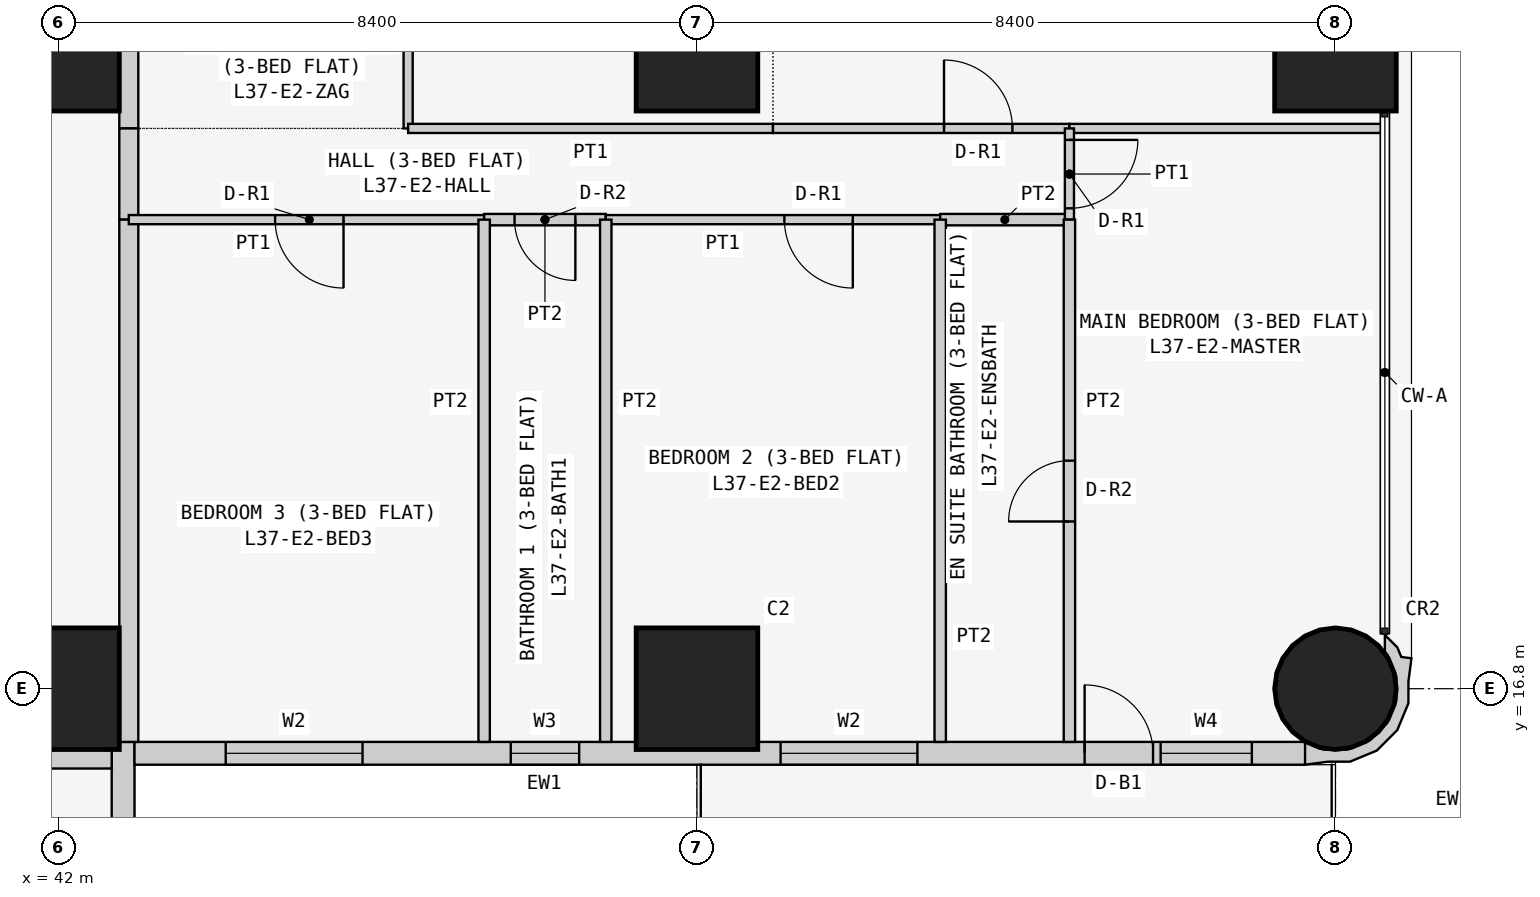
"""IFC4 building model, lengths in metres.
Left out: names, types, materials, properties, quantities, classifications, styles, units other than length and angle.
Written with IfcOpenShell. Run it as: python <this file> out.ifc"""

import sys

from ifc_helpers import new_model, si_unit, direction, frame, frame_2d, origin, origin_2d, place, context, subcontext, project, spatial, polyline, rectangle, circle, outline, extrude, element, fill, save


model = new_model("IFC4")
c1 = context("Model", 3, precision=1e-05, world=origin(), true_north=direction((0.0, 1.0)))
c2 = subcontext(c1, "Body", "Model", "MODEL_VIEW")
j1 = project(units=[si_unit("LENGTHUNIT", "METRE"), si_unit("PLANEANGLEUNIT", "RADIAN")], contexts=[c1])
p1 = place(None, origin())
s1 = spatial("IfcSite", under=j1, at=p1, CompositionType="ELEMENT")
p2 = place(p1, origin())
s2 = spatial("IfcBuilding", under=s1, at=p2, CompositionType="ELEMENT")
p3 = place(p2, frame((0.0, 0.0, 144.9)))
s3 = spatial("IfcBuildingStorey", under=s2, at=p3, CompositionType="ELEMENT", Elevation=144.9)
for number, where, z_axis, x_axis in (
    (1, (42.0, 16.8, 0.0), (0.0, 0.0, 1.0), (1.0, 0.0, 0.0)),
    (2, (42.0, 25.2, 0.0), (0.0, 0.0, 1.0), (1.0, 0.0, 0.0)),
    (3, (50.4, 16.8, 0.0), (0.0, 0.0, 1.0), (1.0, 0.0, 0.0)),
    (4, (50.4, 25.2, 0.0), (0.0, 0.0, 1.0), (1.0, 0.0, 0.0)),
):
    element("IfcColumn", number, at=place(p3, frame(where, z_axis=z_axis, x_axis=x_axis)), inside=s3, PredefinedType="COLUMN", context=c2, shape_type="SweptSolid", body=[
        extrude(rectangle(XDim=1.6, YDim=1.6, at=origin_2d()), origin(), (0.0, 0.0, 1.0), 3.6),
    ])
p4 = place(p3, frame((58.8, 16.8, 0.0), z_axis=(0.0, 0.0, 1.0), x_axis=(1.0, 0.0, 0.0)))
e5 = element("IfcColumn", 5, at=p4, inside=s3, PredefinedType="COLUMN", context=c2, shape_type="SweptSolid", body=[
    extrude(circle(Radius=0.8, at=origin_2d()), origin(), (0.0, 0.0, 1.0), 3.6),
])
p5 = place(p3, frame((58.8, 25.2, 0.0), z_axis=(0.0, 0.0, 1.0), x_axis=(1.0, 0.0, 0.0)))
e6 = element("IfcColumn", 6, at=p5, inside=s3, PredefinedType="COLUMN", context=c2, shape_type="SweptSolid", body=[
    extrude(rectangle(XDim=1.6, YDim=1.6, at=origin_2d()), origin(), (0.0, 0.0, 1.0), 3.6),
])
p6 = place(p3, frame((42.85, 8.8, 0.0), z_axis=(0.0, 0.0, 1.0), x_axis=(0.0, 1.0, 0.0)))
e7 = element("IfcWall", 7, at=p6, inside=s3, PredefinedType="SOLIDWALL", context=c2, shape_type="SweptSolid", body=[
    extrude(rectangle(XDim=7.3, YDim=0.3, at=frame_2d((3.65, 0.0))), origin(), (0.0, 0.0, 1.0), 3.45),
])
p7 = place(p6, frame((3.1, 0.0, 0.9)))
e8 = element("IfcOpeningElement", 8, at=p7, cuts=e7, PredefinedType="OPENING", context=c2, shape_type="SweptSolid", body=[
    extrude(rectangle(XDim=2.4, YDim=1.5, at=frame_2d((1.2, 0.75))), frame((0.0, 0.16, 0.0), z_axis=(0.0, -1.0, 0.0), x_axis=(1.0, 0.0, 0.0)), (0.0, 0.0, 1.0), 0.32),
])
p8 = place(p6, frame((0.75, 0.0, 0.9)))
e9 = element("IfcOpeningElement", 9, at=p8, cuts=e7, PredefinedType="OPENING", context=c2, shape_type="SweptSolid", body=[
    extrude(rectangle(XDim=1.2, YDim=1.5, at=frame_2d((0.6, 0.75))), frame((0.0, 0.16, 0.0), z_axis=(0.0, -1.0, 0.0), x_axis=(1.0, 0.0, 0.0)), (0.0, 0.0, 1.0), 0.32),
])
p9 = place(p3, frame((43.0, 15.95, 0.0), z_axis=(0.0, 0.0, 1.0), x_axis=(1.0, 0.0, 0.0)))
e10 = element("IfcWall", 10, at=p9, inside=s3, PredefinedType="SOLIDWALL", context=c2, shape_type="SweptSolid", body=[
    extrude(rectangle(XDim=15.4, YDim=0.3, at=frame_2d((7.7, 0.0))), origin(), (0.0, 0.0, 1.0), 3.45),
])
p10 = place(p9, frame((1.2, 0.0, 0.9)))
e11 = element("IfcOpeningElement", 11, at=p10, cuts=e10, PredefinedType="OPENING", context=c2, shape_type="SweptSolid", body=[
    extrude(rectangle(XDim=1.8, YDim=1.5, at=frame_2d((0.9, 0.75))), frame((0.0, 0.16, 0.0), z_axis=(0.0, -1.0, 0.0), x_axis=(1.0, 0.0, 0.0)), (0.0, 0.0, 1.0), 0.32),
])
p11 = place(p9, frame((4.95, 0.0, 1.5)))
e12 = element("IfcOpeningElement", 12, at=p11, cuts=e10, PredefinedType="OPENING", context=c2, shape_type="SweptSolid", body=[
    extrude(rectangle(XDim=0.9, YDim=0.7, at=frame_2d((0.45, 0.35))), frame((0.0, 0.16, 0.0), z_axis=(0.0, -1.0, 0.0), x_axis=(1.0, 0.0, 0.0)), (0.0, 0.0, 1.0), 0.32),
])
p12 = place(p9, frame((8.5, 0.0, 0.9)))
e13 = element("IfcOpeningElement", 13, at=p12, cuts=e10, PredefinedType="OPENING", context=c2, shape_type="SweptSolid", body=[
    extrude(rectangle(XDim=1.8, YDim=1.5, at=frame_2d((0.9, 0.75))), frame((0.0, 0.16, 0.0), z_axis=(0.0, -1.0, 0.0), x_axis=(1.0, 0.0, 0.0)), (0.0, 0.0, 1.0), 0.32),
])
p13 = place(p9, frame((12.5, 0.0, 0.0)))
e14 = element("IfcOpeningElement", 14, at=p13, cuts=e10, PredefinedType="OPENING", context=c2, shape_type="SweptSolid", body=[
    extrude(rectangle(XDim=0.9, YDim=2.4, at=frame_2d((0.45, 1.2))), frame((0.0, 0.16, 0.0), z_axis=(0.0, -1.0, 0.0), x_axis=(1.0, 0.0, 0.0)), (0.0, 0.0, 1.0), 0.32),
])
p14 = place(p9, frame((13.5, 0.0, 0.9)))
e15 = element("IfcOpeningElement", 15, at=p14, cuts=e10, PredefinedType="OPENING", context=c2, shape_type="SweptSolid", body=[
    extrude(rectangle(XDim=1.2, YDim=1.5, at=frame_2d((0.6, 0.75))), frame((0.0, 0.16, 0.0), z_axis=(0.0, -1.0, 0.0), x_axis=(1.0, 0.0, 0.0)), (0.0, 0.0, 1.0), 0.32),
])
p15 = place(p3, frame((58.473, 15.983, 0.0), z_axis=(0.0, 0.0, 1.0), x_axis=(0.93923434088, -0.343276641956, 0.0)))
e16 = element("IfcWall", 16, at=p15, inside=s3, PredefinedType="SOLIDWALL", context=c2, shape_type="SweptSolid", body=[
    extrude(outline(polyline([(0.828, 1.599), (0.697, 1.569), (0.604, 1.67), (0.394, 1.767), (0.471, 1.556), (0.508, 1.539), (0.724, 1.304), (0.834, 1.005), (0.82, 0.686), (0.686, 0.397), (0.451, 0.182), (0.152, 0.073), (-0.116, 0.084), (-0.127, 0.078), (-0.146, 0.071), (-0.006, -0.197), (0.266, -0.055), (0.535, 0.044), (0.817, 0.302), (0.978, 0.648), (0.994, 1.03), (0.895, 1.3), (0.828, 1.599)])), origin(), (0.0, 0.0, 1.0), 3.45),
])
p16 = place(p3, frame((42.925, 29.4, 0.0), z_axis=(0.0, 0.0, 1.0), x_axis=(0.0, -1.0, 0.0)))
e17 = element("IfcWall", 17, at=p16, inside=s3, PredefinedType="PARTITIONING", context=c2, shape_type="SweptSolid", body=[
    extrude(rectangle(XDim=5.229, YDim=0.25, at=frame_2d((2.615, 0.0))), origin(), (0.0, 0.0, 1.0), 3.45),
])
p17 = place(p16, frame((2.1, 0.0, 0.0)))
e18 = element("IfcOpeningElement", 18, at=p17, cuts=e17, PredefinedType="OPENING", context=c2, shape_type="SweptSolid", body=[
    extrude(rectangle(XDim=1.0, YDim=2.1, at=frame_2d((0.5, 1.05))), frame((0.0, 0.135, 0.0), z_axis=(0.0, -1.0, 0.0), x_axis=(1.0, 0.0, 0.0)), (0.0, 0.0, 1.0), 0.27),
])
p18 = place(p3, frame((42.925, 24.171, 0.0), z_axis=(0.0, 0.0, 1.0), x_axis=(0.0, -1.0, 0.0)))
e19 = element("IfcWall", 19, at=p18, inside=s3, PredefinedType="PARTITIONING", context=c2, shape_type="SweptSolid", body=[
    extrude(rectangle(XDim=1.2, YDim=0.25, at=frame_2d((0.6, 0.0))), origin(), (0.0, 0.0, 1.0), 3.45),
])
for number, where, z_axis, x_axis in (
    (20, (42.925, 22.971, 0.0), (0.0, 0.0, 1.0), (0.0, -1.0, 0.0)),
    (21, (42.7, 15.875, 0.0), (0.0, 0.0, 1.0), (-1.0, 0.0, 0.0)),
):
    element("IfcWall", number, at=place(p3, frame(where, z_axis=z_axis, x_axis=x_axis)), inside=s3, PredefinedType="PARTITIONING", context=c2, shape_type="SweptSolid", body=[
        extrude(rectangle(XDim=6.871, YDim=0.25, at=frame_2d((3.436, 0.0))), origin(), (0.0, 0.0, 1.0), 3.45),
    ])
p19 = place(p3, frame((46.6, 29.4, 0.0), z_axis=(0.0, 0.0, 1.0), x_axis=(0.0, -1.0, 0.0)))
e22 = element("IfcWall", 22, at=p19, inside=s3, PredefinedType="PARTITIONING", context=c2, shape_type="SweptSolid", body=[
    extrude(rectangle(XDim=5.229, YDim=0.12, at=frame_2d((2.615, 0.0))), origin(), (0.0, 0.0, 1.0), 3.45),
])
p20 = place(p19, frame((1.05, 0.0, 0.0)))
e23 = element("IfcOpeningElement", 23, at=p20, cuts=e22, PredefinedType="OPENING", context=c2, shape_type="SweptSolid", body=[
    extrude(rectangle(XDim=0.9, YDim=2.1, at=frame_2d((0.45, 1.05))), frame((0.0, 0.07, 0.0), z_axis=(0.0, -1.0, 0.0), x_axis=(1.0, 0.0, 0.0)), (0.0, 0.0, 1.0), 0.14),
])
p21 = place(p3, frame((51.4, 24.171, 0.0), z_axis=(0.0, 0.0, 1.0), x_axis=(-1.0, 0.0, 0.0)))
e24 = element("IfcWall", 24, at=p21, inside=s3, PredefinedType="PARTITIONING", context=c2, shape_type="SweptSolid", body=[
    extrude(rectangle(XDim=4.8, YDim=0.12, at=frame_2d((2.4, 0.0))), origin(), (0.0, 0.0, 1.0), 3.45),
])
p22 = place(p3, frame((55.3, 24.171, 0.0), z_axis=(0.0, 0.0, 1.0), x_axis=(-1.0, 0.0, 0.0)))
e25 = element("IfcWall", 25, at=p22, inside=s3, PredefinedType="PARTITIONING", context=c2, shape_type="SweptSolid", body=[
    extrude(rectangle(XDim=3.9, YDim=0.12, at=frame_2d((1.95, 0.0))), origin(), (0.0, 0.0, 1.0), 3.45),
])
p23 = place(p22, frame((0.75, 0.0, 0.0)))
e26 = element("IfcOpeningElement", 26, at=p23, cuts=e25, PredefinedType="OPENING", context=c2, shape_type="SweptSolid", body=[
    extrude(rectangle(XDim=0.9, YDim=2.1, at=frame_2d((0.45, 1.05))), frame((0.0, 0.07, 0.0), z_axis=(0.0, -1.0, 0.0), x_axis=(1.0, 0.0, 0.0)), (0.0, 0.0, 1.0), 0.14),
])
p24 = place(p3, frame((59.45, 24.171, 0.0), z_axis=(0.0, 0.0, 1.0), x_axis=(-1.0, 0.0, 0.0)))
e27 = element("IfcWall", 27, at=p24, inside=s3, PredefinedType="PARTITIONING", context=c2, shape_type="SweptSolid", body=[
    extrude(rectangle(XDim=4.15, YDim=0.12, at=frame_2d((2.075, 0.0))), origin(), (0.0, 0.0, 1.0), 3.45),
])
p25 = place(p3, frame((47.6, 22.971, 0.0), z_axis=(0.0, 0.0, 1.0), x_axis=(-1.0, 0.0, 0.0)))
e28 = element("IfcWall", 28, at=p25, inside=s3, PredefinedType="PARTITIONING", context=c2, shape_type="SweptSolid", body=[
    extrude(rectangle(XDim=4.675, YDim=0.12, at=frame_2d((2.337, 0.0))), origin(), (0.0, 0.0, 1.0), 3.45),
])
p26 = place(p25, frame((1.85, 0.0, 0.0)))
e29 = element("IfcOpeningElement", 29, at=p26, cuts=e28, PredefinedType="OPENING", context=c2, shape_type="SweptSolid", body=[
    extrude(rectangle(XDim=0.9, YDim=2.1, at=frame_2d((0.45, 1.05))), frame((0.0, 0.07, 0.0), z_axis=(0.0, -1.0, 0.0), x_axis=(1.0, 0.0, 0.0)), (0.0, 0.0, 1.0), 0.14),
])
p27 = place(p3, frame((49.2, 22.971, 0.0), z_axis=(0.0, 0.0, 1.0), x_axis=(-1.0, 0.0, 0.0)))
e30 = element("IfcWall", 30, at=p27, inside=s3, PredefinedType="PARTITIONING", context=c2, shape_type="SweptSolid", body=[
    extrude(rectangle(XDim=1.6, YDim=0.15, at=frame_2d((0.8, 0.0))), origin(), (0.0, 0.0, 1.0), 3.45),
])
p28 = place(p27, frame((0.4, 0.0, 0.0)))
e31 = element("IfcOpeningElement", 31, at=p28, cuts=e30, PredefinedType="OPENING", context=c2, shape_type="SweptSolid", body=[
    extrude(rectangle(XDim=0.8, YDim=2.1, at=frame_2d((0.4, 1.05))), frame((0.0, 0.085, 0.0), z_axis=(0.0, -1.0, 0.0), x_axis=(1.0, 0.0, 0.0)), (0.0, 0.0, 1.0), 0.17),
])
p29 = place(p3, frame((53.6, 22.971, 0.0), z_axis=(0.0, 0.0, 1.0), x_axis=(-1.0, 0.0, 0.0)))
e32 = element("IfcWall", 32, at=p29, inside=s3, PredefinedType="PARTITIONING", context=c2, shape_type="SweptSolid", body=[
    extrude(rectangle(XDim=4.4, YDim=0.12, at=frame_2d((2.2, 0.0))), origin(), (0.0, 0.0, 1.0), 3.45),
])
p30 = place(p29, frame((1.15, 0.0, 0.0)))
e33 = element("IfcOpeningElement", 33, at=p30, cuts=e32, PredefinedType="OPENING", context=c2, shape_type="SweptSolid", body=[
    extrude(rectangle(XDim=0.9, YDim=2.1, at=frame_2d((0.45, 1.05))), frame((0.0, 0.07, 0.0), z_axis=(0.0, -1.0, 0.0), x_axis=(1.0, 0.0, 0.0)), (0.0, 0.0, 1.0), 0.14),
])
p31 = place(p3, frame((55.3, 22.971, 0.0), z_axis=(0.0, 0.0, 1.0), x_axis=(-1.0, 0.0, 0.0)))
e34 = element("IfcWall", 34, at=p31, inside=s3, PredefinedType="PARTITIONING", context=c2, shape_type="SweptSolid", body=[
    extrude(rectangle(XDim=1.7, YDim=0.15, at=frame_2d((0.85, 0.0))), origin(), (0.0, 0.0, 1.0), 3.45),
])
p32 = place(p3, frame((55.3, 24.171, 0.0), z_axis=(0.0, 0.0, 1.0), x_axis=(0.0, -1.0, 0.0)))
e35 = element("IfcWall", 35, at=p32, inside=s3, PredefinedType="PARTITIONING", context=c2, shape_type="SweptSolid", body=[
    extrude(rectangle(XDim=1.2, YDim=0.12, at=frame_2d((0.6, 0.0))), origin(), (0.0, 0.0, 1.0), 3.45),
])
p33 = place(p32, frame((0.151, 0.0, 0.0)))
e36 = element("IfcOpeningElement", 36, at=p33, cuts=e35, PredefinedType="OPENING", context=c2, shape_type="SweptSolid", body=[
    extrude(rectangle(XDim=0.9, YDim=2.1, at=frame_2d((0.45, 1.05))), frame((0.0, 0.07, 0.0), z_axis=(0.0, -1.0, 0.0), x_axis=(1.0, 0.0, 0.0)), (0.0, 0.0, 1.0), 0.14),
])
for number, where, z_axis, x_axis in (
    (37, (47.6, 22.971, 0.0), (0.0, 0.0, 1.0), (0.0, -1.0, 0.0)),
    (38, (49.2, 22.971, 0.0), (0.0, 0.0, 1.0), (0.0, -1.0, 0.0)),
    (39, (53.6, 22.971, 0.0), (0.0, 0.0, 1.0), (0.0, -1.0, 0.0)),
):
    element("IfcWall", number, at=place(p3, frame(where, z_axis=z_axis, x_axis=x_axis)), inside=s3, PredefinedType="PARTITIONING", context=c2, shape_type="SweptSolid", body=[
        extrude(rectangle(XDim=6.871, YDim=0.15, at=frame_2d((3.436, 0.0))), origin(), (0.0, 0.0, 1.0), 3.45),
    ])
p34 = place(p3, frame((55.3, 22.971, 0.0), z_axis=(0.0, 0.0, 1.0), x_axis=(0.0, -1.0, 0.0)))
e40 = element("IfcWall", 40, at=p34, inside=s3, PredefinedType="PARTITIONING", context=c2, shape_type="SweptSolid", body=[
    extrude(rectangle(XDim=6.871, YDim=0.15, at=frame_2d((3.436, 0.0))), origin(), (0.0, 0.0, 1.0), 3.45),
])
p35 = place(p34, frame((3.171, 0.0, 0.0)))
e41 = element("IfcOpeningElement", 41, at=p35, cuts=e40, PredefinedType="OPENING", context=c2, shape_type="SweptSolid", body=[
    extrude(rectangle(XDim=0.8, YDim=2.1, at=frame_2d((0.4, 1.05))), frame((0.0, 0.085, 0.0), z_axis=(0.0, -1.0, 0.0), x_axis=(1.0, 0.0, 0.0)), (0.0, 0.0, 1.0), 0.17),
])
p36 = place(p10, origin())
e42 = element("IfcWindow", 42, at=p36, inside=s3, PartitioningType="SINGLE_PANEL", PredefinedType="WINDOW", context=c2, shape_type="SweptSolid", body=[
    extrude(rectangle(XDim=1.8, YDim=1.5, at=frame_2d((0.9, 0.75))), frame((0.0, 0.03, 0.0), z_axis=(0.0, -1.0, 0.0), x_axis=(1.0, 0.0, 0.0)), (0.0, 0.0, 1.0), 0.06),
])
fill(e11, e42)
p37 = place(p11, origin())
e43 = element("IfcWindow", 43, at=p37, inside=s3, PartitioningType="SINGLE_PANEL", PredefinedType="WINDOW", context=c2, shape_type="SweptSolid", body=[
    extrude(rectangle(XDim=0.9, YDim=0.7, at=frame_2d((0.45, 0.35))), frame((0.0, 0.03, 0.0), z_axis=(0.0, -1.0, 0.0), x_axis=(1.0, 0.0, 0.0)), (0.0, 0.0, 1.0), 0.06),
])
fill(e12, e43)
p38 = place(p12, origin())
e44 = element("IfcWindow", 44, at=p38, inside=s3, PartitioningType="SINGLE_PANEL", PredefinedType="WINDOW", context=c2, shape_type="SweptSolid", body=[
    extrude(rectangle(XDim=1.8, YDim=1.5, at=frame_2d((0.9, 0.75))), frame((0.0, 0.03, 0.0), z_axis=(0.0, -1.0, 0.0), x_axis=(1.0, 0.0, 0.0)), (0.0, 0.0, 1.0), 0.06),
])
fill(e13, e44)
p39 = place(p13, origin())
e45 = element("IfcDoor", 45, at=p39, inside=s3, OperationType="SINGLE_SWING_LEFT", PredefinedType="DOOR", context=c2, shape_type="SweptSolid", body=[
    extrude(rectangle(XDim=0.9, YDim=2.4, at=frame_2d((0.45, 1.2))), frame((0.0, 0.025, 0.0), z_axis=(0.0, -1.0, 0.0), x_axis=(1.0, 0.0, 0.0)), (0.0, 0.0, 1.0), 0.05),
])
fill(e14, e45)
p40 = place(p14, origin())
e46 = element("IfcWindow", 46, at=p40, inside=s3, PartitioningType="SINGLE_PANEL", PredefinedType="WINDOW", context=c2, shape_type="SweptSolid", body=[
    extrude(rectangle(XDim=1.2, YDim=1.5, at=frame_2d((0.6, 0.75))), frame((0.0, 0.03, 0.0), z_axis=(0.0, -1.0, 0.0), x_axis=(1.0, 0.0, 0.0)), (0.0, 0.0, 1.0), 0.06),
])
fill(e15, e46)
p41 = place(p23, frame((0.9, 0.0, 0.0), z_axis=(0.0, 0.0, 1.0), x_axis=(-1.0, 0.0, 0.0)))
e47 = element("IfcDoor", 47, at=p41, inside=s3, OperationType="SINGLE_SWING_LEFT", PredefinedType="DOOR", context=c2, shape_type="SweptSolid", body=[
    extrude(rectangle(XDim=0.9, YDim=2.1, at=frame_2d((0.45, 1.05))), frame((0.0, 0.025, 0.0), z_axis=(0.0, -1.0, 0.0), x_axis=(1.0, 0.0, 0.0)), (0.0, 0.0, 1.0), 0.05),
])
fill(e26, e47)
p42 = place(p26, origin())
e48 = element("IfcDoor", 48, at=p42, inside=s3, OperationType="SINGLE_SWING_LEFT", PredefinedType="DOOR", context=c2, shape_type="SweptSolid", body=[
    extrude(rectangle(XDim=0.9, YDim=2.1, at=frame_2d((0.45, 1.05))), frame((0.0, 0.025, 0.0), z_axis=(0.0, -1.0, 0.0), x_axis=(1.0, 0.0, 0.0)), (0.0, 0.0, 1.0), 0.05),
])
fill(e29, e48)
p43 = place(p28, origin())
e49 = element("IfcDoor", 49, at=p43, inside=s3, OperationType="SINGLE_SWING_LEFT", PredefinedType="DOOR", context=c2, shape_type="SweptSolid", body=[
    extrude(rectangle(XDim=0.8, YDim=2.1, at=frame_2d((0.4, 1.05))), frame((0.0, 0.025, 0.0), z_axis=(0.0, -1.0, 0.0), x_axis=(1.0, 0.0, 0.0)), (0.0, 0.0, 1.0), 0.05),
])
fill(e31, e49)
p44 = place(p30, origin())
e50 = element("IfcDoor", 50, at=p44, inside=s3, OperationType="SINGLE_SWING_LEFT", PredefinedType="DOOR", context=c2, shape_type="SweptSolid", body=[
    extrude(rectangle(XDim=0.9, YDim=2.1, at=frame_2d((0.45, 1.05))), frame((0.0, 0.025, 0.0), z_axis=(0.0, -1.0, 0.0), x_axis=(1.0, 0.0, 0.0)), (0.0, 0.0, 1.0), 0.05),
])
fill(e33, e50)
p45 = place(p33, origin())
e51 = element("IfcDoor", 51, at=p45, inside=s3, OperationType="SINGLE_SWING_LEFT", PredefinedType="DOOR", context=c2, shape_type="SweptSolid", body=[
    extrude(rectangle(XDim=0.9, YDim=2.1, at=frame_2d((0.45, 1.05))), frame((0.0, 0.025, 0.0), z_axis=(0.0, -1.0, 0.0), x_axis=(1.0, 0.0, 0.0)), (0.0, 0.0, 1.0), 0.05),
])
fill(e36, e51)
p46 = place(p35, frame((0.8, 0.0, 0.0), z_axis=(0.0, 0.0, 1.0), x_axis=(-1.0, 0.0, 0.0)))
e52 = element("IfcDoor", 52, at=p46, inside=s3, OperationType="SINGLE_SWING_LEFT", PredefinedType="DOOR", context=c2, shape_type="SweptSolid", body=[
    extrude(rectangle(XDim=0.8, YDim=2.1, at=frame_2d((0.4, 1.05))), frame((0.0, 0.025, 0.0), z_axis=(0.0, -1.0, 0.0), x_axis=(1.0, 0.0, 0.0)), (0.0, 0.0, 1.0), 0.05),
])
fill(e41, e52)
save(model, sys.argv[1])
